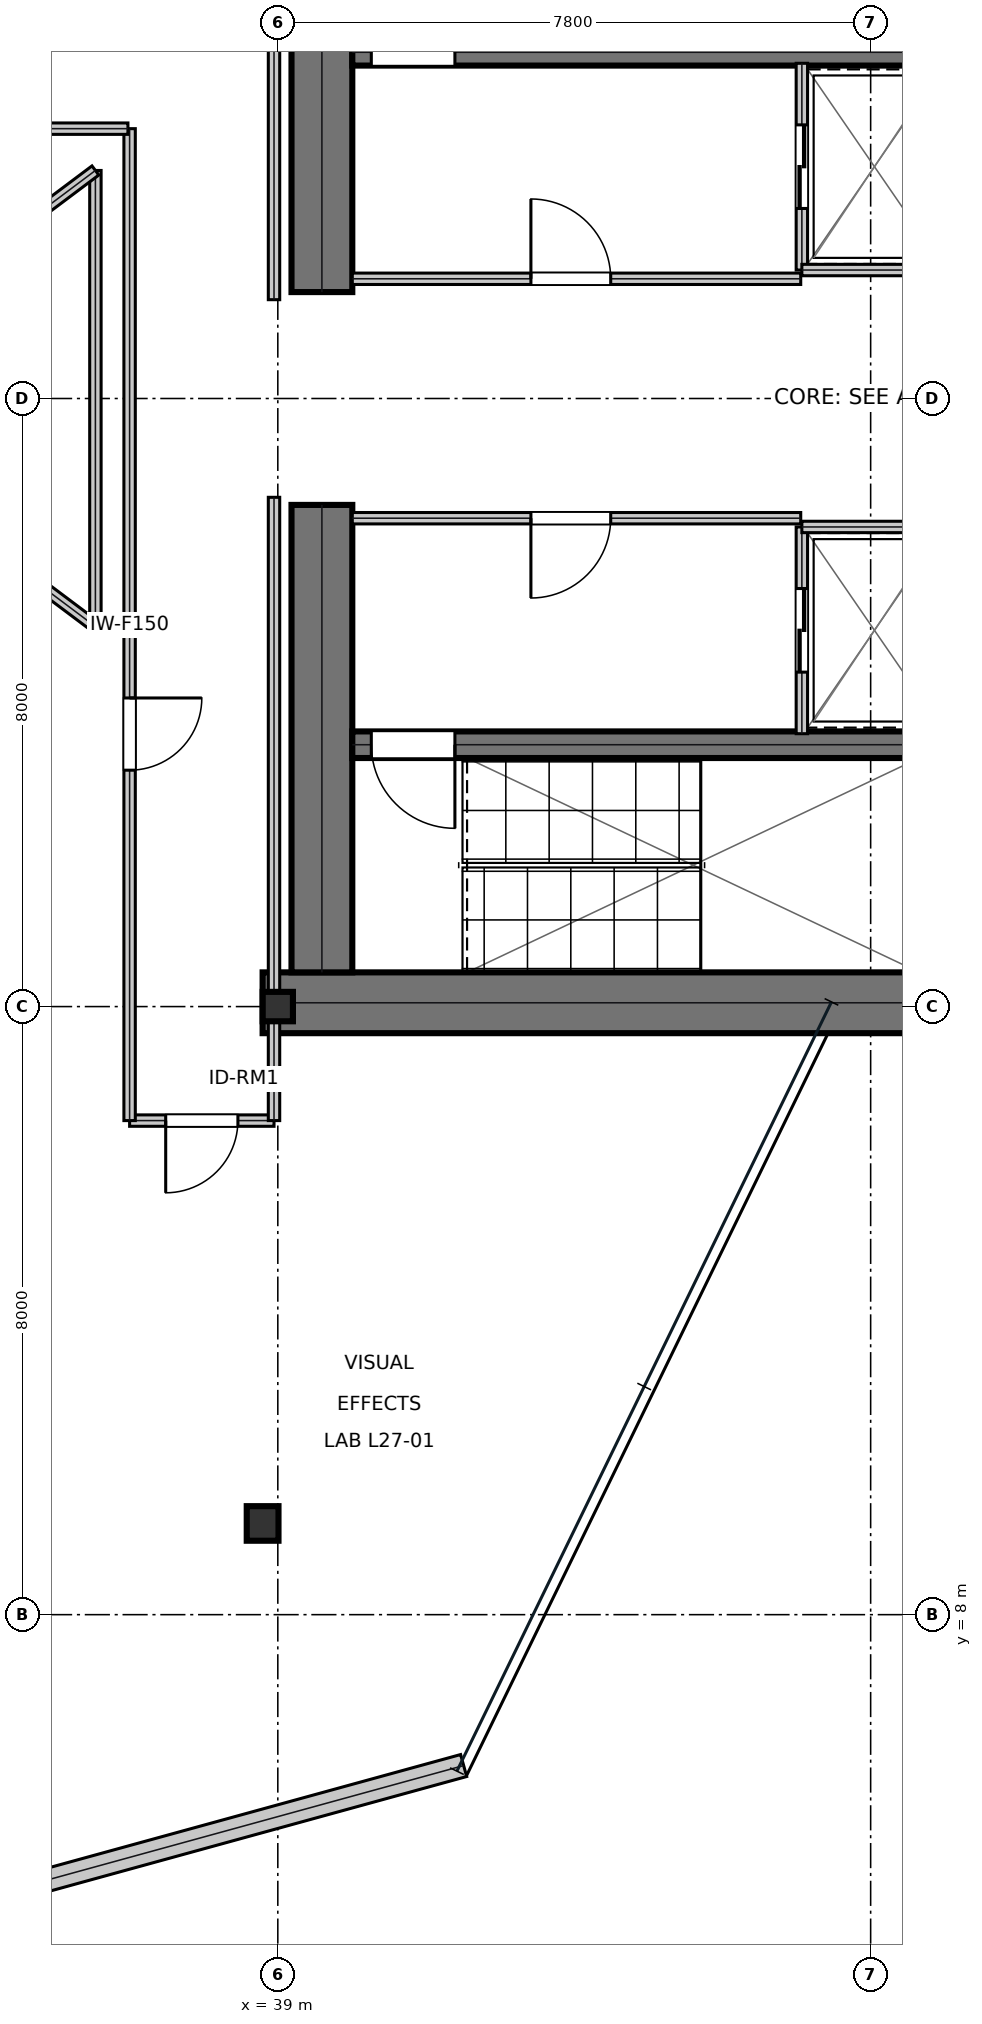
"""IFC4 building model, lengths in metres.
Left out: names, types, materials, properties, quantities, classifications, styles, units other than length and angle.
Written with IfcOpenShell. Run it as: python <this file> out.ifc"""

import sys

from ifc_helpers import new_model, si_unit, direction, frame, frame_2d, origin, origin_2d, place, context, subcontext, project, spatial, rectangle, i_section, extrude, element, fill, save


model = new_model("IFC4")
c1 = context("Model", 3, precision=1e-05, world=origin(), true_north=direction((0.0, 1.0)))
c2 = subcontext(c1, "Body", "Model", "MODEL_VIEW")
j1 = project(units=[si_unit("LENGTHUNIT", "METRE"), si_unit("PLANEANGLEUNIT", "RADIAN")], contexts=[c1])
p1 = place(None, origin())
s1 = spatial("IfcSite", under=j1, at=p1, CompositionType="ELEMENT")
p2 = place(p1, origin())
s2 = spatial("IfcBuilding", under=s1, at=p2, CompositionType="ELEMENT")
p3 = place(p2, frame((0.0, 0.0, 120.9)))
s3 = spatial("IfcBuildingStorey", under=s2, at=p3, CompositionType="ELEMENT", Elevation=120.9)
p4 = place(p3, frame((38.8, 16.05, 0.0), z_axis=(0.0, 0.0, 1.0), x_axis=(1.0, 0.0, 0.0)))
e1 = element("IfcWall", 1, at=p4, inside=s3, PredefinedType="SHEAR", context=c2, shape_type="SweptSolid", body=[
    extrude(rectangle(XDim=16.0, YDim=0.8, at=frame_2d((8.0, 0.0))), origin(), (0.0, 0.0, 1.0), 3.81),
])
for number, where, z_axis, x_axis in (
    (2, (39.58, 16.45, 0.0), (0.0, 0.0, 1.0), (0.0, 1.0, 0.0)),
    (3, (39.58, 25.4, 0.0), (0.0, 0.0, 1.0), (0.0, 1.0, 0.0)),
):
    element("IfcWall", number, at=place(p3, frame(where, z_axis=z_axis, x_axis=x_axis)), inside=s3, PredefinedType="SHEAR", context=c2, shape_type="SweptSolid", body=[
        extrude(rectangle(XDim=6.15, YDim=0.8, at=frame_2d((3.075, 0.0))), origin(), (0.0, 0.0, 1.0), 3.81),
    ])
p5 = place(p3, frame((39.98, 28.555, 0.0), z_axis=(0.0, 0.0, 1.0), x_axis=(1.0, 0.0, 0.0)))
e4 = element("IfcWall", 4, at=p5, inside=s3, PredefinedType="SHEAR", context=c2, shape_type="SweptSolid", body=[
    extrude(rectangle(XDim=7.71, YDim=0.35, at=frame_2d((3.855, 0.0))), origin(), (0.0, 0.0, 1.0), 3.81),
])
p6 = place(p5, frame((0.25, 0.0, 0.0)))
e5 = element("IfcOpeningElement", 5, at=p6, cuts=e4, PredefinedType="OPENING", context=c2, shape_type="SweptSolid", body=[
    extrude(rectangle(XDim=1.1, YDim=2.15, at=frame_2d((0.55, 1.075))), frame((0.0, 0.185, 0.0), z_axis=(0.0, -1.0, 0.0), x_axis=(1.0, 0.0, 0.0)), (0.0, 0.0, 1.0), 0.37),
])
p7 = place(p3, frame((39.98, 19.445, 0.0), z_axis=(0.0, 0.0, 1.0), x_axis=(1.0, 0.0, 0.0)))
e6 = element("IfcWall", 6, at=p7, inside=s3, PredefinedType="SHEAR", context=c2, shape_type="SweptSolid", body=[
    extrude(rectangle(XDim=7.71, YDim=0.35, at=frame_2d((3.855, 0.0))), origin(), (0.0, 0.0, 1.0), 3.81),
])
p8 = place(p7, frame((0.25, 0.0, 0.0)))
e7 = element("IfcOpeningElement", 7, at=p8, cuts=e6, PredefinedType="OPENING", context=c2, shape_type="SweptSolid", body=[
    extrude(rectangle(XDim=1.1, YDim=2.15, at=frame_2d((0.55, 1.075))), frame((0.0, 0.185, 0.0), z_axis=(0.0, -1.0, 0.0), x_axis=(1.0, 0.0, 0.0)), (0.0, 0.0, 1.0), 0.37),
])
p9 = place(p3, frame((39.0, 16.0, 0.0), z_axis=(0.0, 0.0, 1.0), x_axis=(1.0, 0.0, 0.0)))
e8 = element("IfcColumn", 8, at=p9, inside=s3, PredefinedType="COLUMN", context=c2, shape_type="SweptSolid", body=[
    extrude(i_section(OverallWidth=0.398, OverallDepth=0.387, WebThickness=0.021, FlangeThickness=0.033, at=origin_2d()), origin(), (0.0, 0.0, 1.0), 4.044),
])
p10 = place(p3, frame((38.8, 9.2, 0.016), z_axis=(0.0, 0.0, 1.0), x_axis=(1.0, 0.0, 0.0)))
e9 = element("IfcColumn", 9, at=p10, inside=s3, PredefinedType="COLUMN", context=c2, shape_type="SweptSolid", body=[
    extrude(i_section(OverallWidth=0.418, OverallDepth=0.455, WebThickness=0.042, FlangeThickness=0.068, at=origin_2d()), origin(), (0.0, 0.0, 1.0), 4.018),
])
p11 = place(p3, frame((35.043, 4.255, 0.0), z_axis=(0.0, 0.0, 1.0), x_axis=(0.96422724659, 0.265077001894, 0.0)))
e10 = element("IfcWall", 10, at=p11, inside=s3, PredefinedType="STANDARD", context=c2, shape_type="SweptSolid", body=[
    extrude(rectangle(XDim=6.64, YDim=0.3, at=frame_2d((3.32, 0.0))), origin(), (0.0, 0.0, 1.0), 3.81),
])
p12 = place(p3, frame((39.98, 25.575, 0.0), z_axis=(0.0, 0.0, 1.0), x_axis=(1.0, 0.0, 0.0)))
e11 = element("IfcWall", 11, at=p12, inside=s3, PredefinedType="PARTITIONING", context=c2, shape_type="SweptSolid", body=[
    extrude(rectangle(XDim=5.9, YDim=0.15, at=frame_2d((2.95, 0.0))), origin(), (0.0, 0.0, 1.0), 3.81),
])
p13 = place(p12, frame((2.35, 0.0, 0.0)))
e12 = element("IfcOpeningElement", 12, at=p13, cuts=e11, PredefinedType="OPENING", context=c2, shape_type="SweptSolid", body=[
    extrude(rectangle(XDim=1.05, YDim=2.15, at=frame_2d((0.525, 1.075))), frame((0.0, 0.085, 0.0), z_axis=(0.0, -1.0, 0.0), x_axis=(1.0, 0.0, 0.0)), (0.0, 0.0, 1.0), 0.17),
])
p14 = place(p3, frame((39.98, 22.425, 0.0), z_axis=(0.0, 0.0, 1.0), x_axis=(1.0, 0.0, 0.0)))
e13 = element("IfcWall", 13, at=p14, inside=s3, PredefinedType="PARTITIONING", context=c2, shape_type="SweptSolid", body=[
    extrude(rectangle(XDim=5.9, YDim=0.15, at=frame_2d((2.95, 0.0))), origin(), (0.0, 0.0, 1.0), 3.81),
])
p15 = place(p14, frame((2.35, 0.0, 0.0)))
e14 = element("IfcOpeningElement", 14, at=p15, cuts=e13, PredefinedType="OPENING", context=c2, shape_type="SweptSolid", body=[
    extrude(rectangle(XDim=1.05, YDim=2.15, at=frame_2d((0.525, 1.075))), frame((0.0, 0.085, 0.0), z_axis=(0.0, -1.0, 0.0), x_axis=(1.0, 0.0, 0.0)), (0.0, 0.0, 1.0), 0.17),
])
p16 = place(p3, frame((45.895, 25.69, 0.0), z_axis=(0.0, 0.0, 1.0), x_axis=(0.0, 1.0, 0.0)))
e15 = element("IfcWall", 15, at=p16, inside=s3, PredefinedType="PARTITIONING", context=c2, shape_type="SweptSolid", body=[
    extrude(rectangle(XDim=2.72, YDim=0.15, at=frame_2d((1.36, 0.0))), origin(), (0.0, 0.0, 1.0), 3.81),
])
p17 = place(p16, frame((0.81, 0.0, 0.0)))
e16 = element("IfcOpeningElement", 16, at=p17, cuts=e15, PredefinedType="OPENING", context=c2, shape_type="SweptSolid", body=[
    extrude(rectangle(XDim=1.1, YDim=2.15, at=frame_2d((0.55, 1.075))), frame((0.0, 0.085, 0.0), z_axis=(0.0, -1.0, 0.0), x_axis=(1.0, 0.0, 0.0)), (0.0, 0.0, 1.0), 0.17),
])
p18 = place(p3, frame((45.895, 25.69, 0.0), z_axis=(0.0, 0.0, 1.0), x_axis=(1.0, 0.0, 0.0)))
e17 = element("IfcWall", 17, at=p18, inside=s3, PredefinedType="PARTITIONING", context=c2, shape_type="SweptSolid", body=[
    extrude(rectangle(XDim=1.915, YDim=0.15, at=frame_2d((0.958, 0.0))), origin(), (0.0, 0.0, 1.0), 3.81),
])
p19 = place(p3, frame((45.895, 19.59, 0.0), z_axis=(0.0, 0.0, 1.0), x_axis=(0.0, 1.0, 0.0)))
e18 = element("IfcWall", 18, at=p19, inside=s3, PredefinedType="PARTITIONING", context=c2, shape_type="SweptSolid", body=[
    extrude(rectangle(XDim=2.72, YDim=0.15, at=frame_2d((1.36, 0.0))), origin(), (0.0, 0.0, 1.0), 3.81),
])
p20 = place(p19, frame((0.81, 0.0, 0.0)))
e19 = element("IfcOpeningElement", 19, at=p20, cuts=e18, PredefinedType="OPENING", context=c2, shape_type="SweptSolid", body=[
    extrude(rectangle(XDim=1.1, YDim=2.15, at=frame_2d((0.55, 1.075))), frame((0.0, 0.085, 0.0), z_axis=(0.0, -1.0, 0.0), x_axis=(1.0, 0.0, 0.0)), (0.0, 0.0, 1.0), 0.17),
])
p21 = place(p3, frame((45.895, 22.31, 0.0), z_axis=(0.0, 0.0, 1.0), x_axis=(1.0, 0.0, 0.0)))
e20 = element("IfcWall", 20, at=p21, inside=s3, PredefinedType="PARTITIONING", context=c2, shape_type="SweptSolid", body=[
    extrude(rectangle(XDim=1.915, YDim=0.15, at=frame_2d((0.958, 0.0))), origin(), (0.0, 0.0, 1.0), 3.81),
])
p22 = place(p3, frame((37.05, 14.5, 0.0), z_axis=(0.0, 0.0, 1.0), x_axis=(1.0, 0.0, 0.0)))
e21 = element("IfcWall", 21, at=p22, inside=s3, PredefinedType="PARTITIONING", context=c2, shape_type="SweptSolid", body=[
    extrude(rectangle(XDim=1.9, YDim=0.15, at=frame_2d((0.95, 0.0))), origin(), (0.0, 0.0, 1.0), 3.19),
])
p23 = place(p22, frame((0.475, 0.0, 0.0)))
e22 = element("IfcOpeningElement", 22, at=p23, cuts=e21, PredefinedType="OPENING", context=c2, shape_type="SweptSolid", body=[
    extrude(rectangle(XDim=0.95, YDim=2.15, at=frame_2d((0.475, 1.075))), frame((0.0, 0.085, 0.0), z_axis=(0.0, -1.0, 0.0), x_axis=(1.0, 0.0, 0.0)), (0.0, 0.0, 1.0), 0.17),
])
p24 = place(p3, frame((37.05, 14.5, 0.0), z_axis=(0.0, 0.0, 1.0), x_axis=(0.0, 1.0, 0.0)))
e23 = element("IfcWall", 23, at=p24, inside=s3, PredefinedType="PARTITIONING", context=c2, shape_type="SweptSolid", body=[
    extrude(rectangle(XDim=13.05, YDim=0.15, at=frame_2d((6.525, 0.0))), origin(), (0.0, 0.0, 1.0), 3.19),
])
p25 = place(p24, frame((4.61, 0.0, 0.0)))
e24 = element("IfcOpeningElement", 24, at=p25, cuts=e23, PredefinedType="OPENING", context=c2, shape_type="SweptSolid", body=[
    extrude(rectangle(XDim=0.95, YDim=2.15, at=frame_2d((0.475, 1.075))), frame((0.0, 0.085, 0.0), z_axis=(0.0, -1.0, 0.0), x_axis=(1.0, 0.0, 0.0)), (0.0, 0.0, 1.0), 0.17),
])
p26 = place(p3, frame((38.95, 14.5, 0.0), z_axis=(0.0, 0.0, 1.0), x_axis=(0.0, 1.0, 0.0)))
e25 = element("IfcWall", 25, at=p26, inside=s3, PredefinedType="PARTITIONING", context=c2, shape_type="SweptSolid", body=[
    extrude(rectangle(XDim=8.2, YDim=0.15, at=frame_2d((4.1, 0.0))), origin(), (0.0, 0.0, 1.0), 3.19),
])
p27 = place(p3, frame((29.4, 27.55, 0.0), z_axis=(0.0, 0.0, 1.0), x_axis=(1.0, 0.0, 0.0)))
e26 = element("IfcWall", 26, at=p27, inside=s3, PredefinedType="PARTITIONING", context=c2, shape_type="SweptSolid", body=[
    extrude(rectangle(XDim=7.628, YDim=0.15, at=frame_2d((3.814, 0.0))), origin(), (0.0, 0.0, 1.0), 3.19),
])
p28 = place(p3, frame((38.95, 25.3, 0.0), z_axis=(0.0, 0.0, 1.0), x_axis=(0.0, 1.0, 0.0)))
e27 = element("IfcWall", 27, at=p28, inside=s3, PredefinedType="PARTITIONING", context=c2, shape_type="SweptSolid", body=[
    extrude(rectangle(XDim=8.2, YDim=0.15, at=frame_2d((4.1, 0.0))), origin(), (0.0, 0.0, 1.0), 3.19),
])
p29 = place(p3, frame((32.6, 24.0, 0.0), z_axis=(0.0, 0.0, 1.0), x_axis=(0.8, -0.6, 0.0)))
e28 = element("IfcWall", 28, at=p29, inside=s3, PredefinedType="MOVABLE", context=c2, shape_type="SweptSolid", body=[
    extrude(rectangle(XDim=5.0, YDim=0.15, at=frame_2d((2.5, 0.0))), origin(), (0.0, 0.0, 1.0), 3.81),
])
p30 = place(p3, frame((36.6, 21.0, 0.0), z_axis=(0.0, 0.0, 1.0), x_axis=(0.0, 1.0, 0.0)))
e29 = element("IfcWall", 29, at=p30, inside=s3, PredefinedType="MOVABLE", context=c2, shape_type="SweptSolid", body=[
    extrude(rectangle(XDim=6.0, YDim=0.15, at=frame_2d((3.0, 0.0))), origin(), (0.0, 0.0, 1.0), 3.81),
])
p31 = place(p3, frame((36.6, 27.0, 0.0), z_axis=(0.0, 0.0, 1.0), x_axis=(-0.8, -0.6, 0.0)))
e30 = element("IfcWall", 30, at=p31, inside=s3, PredefinedType="MOVABLE", context=c2, shape_type="SweptSolid", body=[
    extrude(rectangle(XDim=5.0, YDim=0.15, at=frame_2d((2.5, 0.0))), origin(), (0.0, 0.0, 1.0), 3.81),
])
p32 = place(p13, origin())
e31 = element("IfcDoor", 31, at=p32, inside=s3, OperationType="SINGLE_SWING_LEFT", PredefinedType="DOOR", context=c2, shape_type="SweptSolid", body=[
    extrude(rectangle(XDim=1.05, YDim=2.15, at=frame_2d((0.525, 1.075))), frame((0.0, 0.025, 0.0), z_axis=(0.0, -1.0, 0.0), x_axis=(1.0, 0.0, 0.0)), (0.0, 0.0, 1.0), 0.05),
])
fill(e12, e31)
p33 = place(p15, frame((1.05, 0.0, 0.0), z_axis=(0.0, 0.0, 1.0), x_axis=(-1.0, 0.0, 0.0)))
e32 = element("IfcDoor", 32, at=p33, inside=s3, OperationType="SINGLE_SWING_RIGHT", PredefinedType="DOOR", context=c2, shape_type="SweptSolid", body=[
    extrude(rectangle(XDim=1.05, YDim=2.15, at=frame_2d((0.525, 1.075))), frame((0.0, 0.025, 0.0), z_axis=(0.0, -1.0, 0.0), x_axis=(1.0, 0.0, 0.0)), (0.0, 0.0, 1.0), 0.05),
])
fill(e14, e32)
p34 = place(p17, frame((1.1, 0.0, 0.0), z_axis=(0.0, 0.0, 1.0), x_axis=(-1.0, 0.0, 0.0)))
e33 = element("IfcDoor", 33, at=p34, inside=s3, OperationType="DOUBLE_DOOR_SLIDING", PredefinedType="DOOR", context=c2, shape_type="SweptSolid", body=[
    extrude(rectangle(XDim=1.1, YDim=2.15, at=frame_2d((0.55, 1.075))), frame((0.0, 0.025, 0.0), z_axis=(0.0, -1.0, 0.0), x_axis=(1.0, 0.0, 0.0)), (0.0, 0.0, 1.0), 0.05),
])
fill(e16, e33)
p35 = place(p20, frame((1.1, 0.0, 0.0), z_axis=(0.0, 0.0, 1.0), x_axis=(-1.0, 0.0, 0.0)))
e34 = element("IfcDoor", 34, at=p35, inside=s3, OperationType="DOUBLE_DOOR_SLIDING", PredefinedType="DOOR", context=c2, shape_type="SweptSolid", body=[
    extrude(rectangle(XDim=1.1, YDim=2.15, at=frame_2d((0.55, 1.075))), frame((0.0, 0.025, 0.0), z_axis=(0.0, -1.0, 0.0), x_axis=(1.0, 0.0, 0.0)), (0.0, 0.0, 1.0), 0.05),
])
fill(e19, e34)
p36 = place(p23, frame((0.95, 0.0, 0.0), z_axis=(0.0, 0.0, 1.0), x_axis=(-1.0, 0.0, 0.0)))
e35 = element("IfcDoor", 35, at=p36, inside=s3, OperationType="SINGLE_SWING_RIGHT", PredefinedType="DOOR", context=c2, shape_type="SweptSolid", body=[
    extrude(rectangle(XDim=0.95, YDim=2.15, at=frame_2d((0.475, 1.075))), frame((0.0, 0.025, 0.0), z_axis=(0.0, -1.0, 0.0), x_axis=(1.0, 0.0, 0.0)), (0.0, 0.0, 1.0), 0.05),
])
fill(e22, e35)
p37 = place(p25, frame((0.95, 0.0, 0.0), z_axis=(0.0, 0.0, 1.0), x_axis=(-1.0, 0.0, 0.0)))
e36 = element("IfcDoor", 36, at=p37, inside=s3, OperationType="SINGLE_SWING_LEFT", PredefinedType="DOOR", context=c2, shape_type="SweptSolid", body=[
    extrude(rectangle(XDim=0.95, YDim=2.15, at=frame_2d((0.475, 1.075))), frame((0.0, 0.025, 0.0), z_axis=(0.0, -1.0, 0.0), x_axis=(1.0, 0.0, 0.0)), (0.0, 0.0, 1.0), 0.05),
])
fill(e24, e36)
p38 = place(p6, origin())
e37 = element("IfcDoor", 37, at=p38, inside=s3, OperationType="SINGLE_SWING_RIGHT", PredefinedType="DOOR", context=c2, shape_type="SweptSolid", body=[
    extrude(rectangle(XDim=1.1, YDim=2.15, at=frame_2d((0.55, 1.075))), frame((0.0, 0.025, 0.0), z_axis=(0.0, -1.0, 0.0), x_axis=(1.0, 0.0, 0.0)), (0.0, 0.0, 1.0), 0.05),
])
fill(e5, e37)
p39 = place(p8, frame((1.1, 0.0, 0.0), z_axis=(0.0, 0.0, 1.0), x_axis=(-1.0, 0.0, 0.0)))
e38 = element("IfcDoor", 38, at=p39, inside=s3, OperationType="SINGLE_SWING_LEFT", PredefinedType="DOOR", context=c2, shape_type="SweptSolid", body=[
    extrude(rectangle(XDim=1.1, YDim=2.15, at=frame_2d((0.55, 1.075))), frame((0.0, 0.025, 0.0), z_axis=(0.0, -1.0, 0.0), x_axis=(1.0, 0.0, 0.0)), (0.0, 0.0, 1.0), 0.05),
])
fill(e7, e38)
save(model, sys.argv[1])
